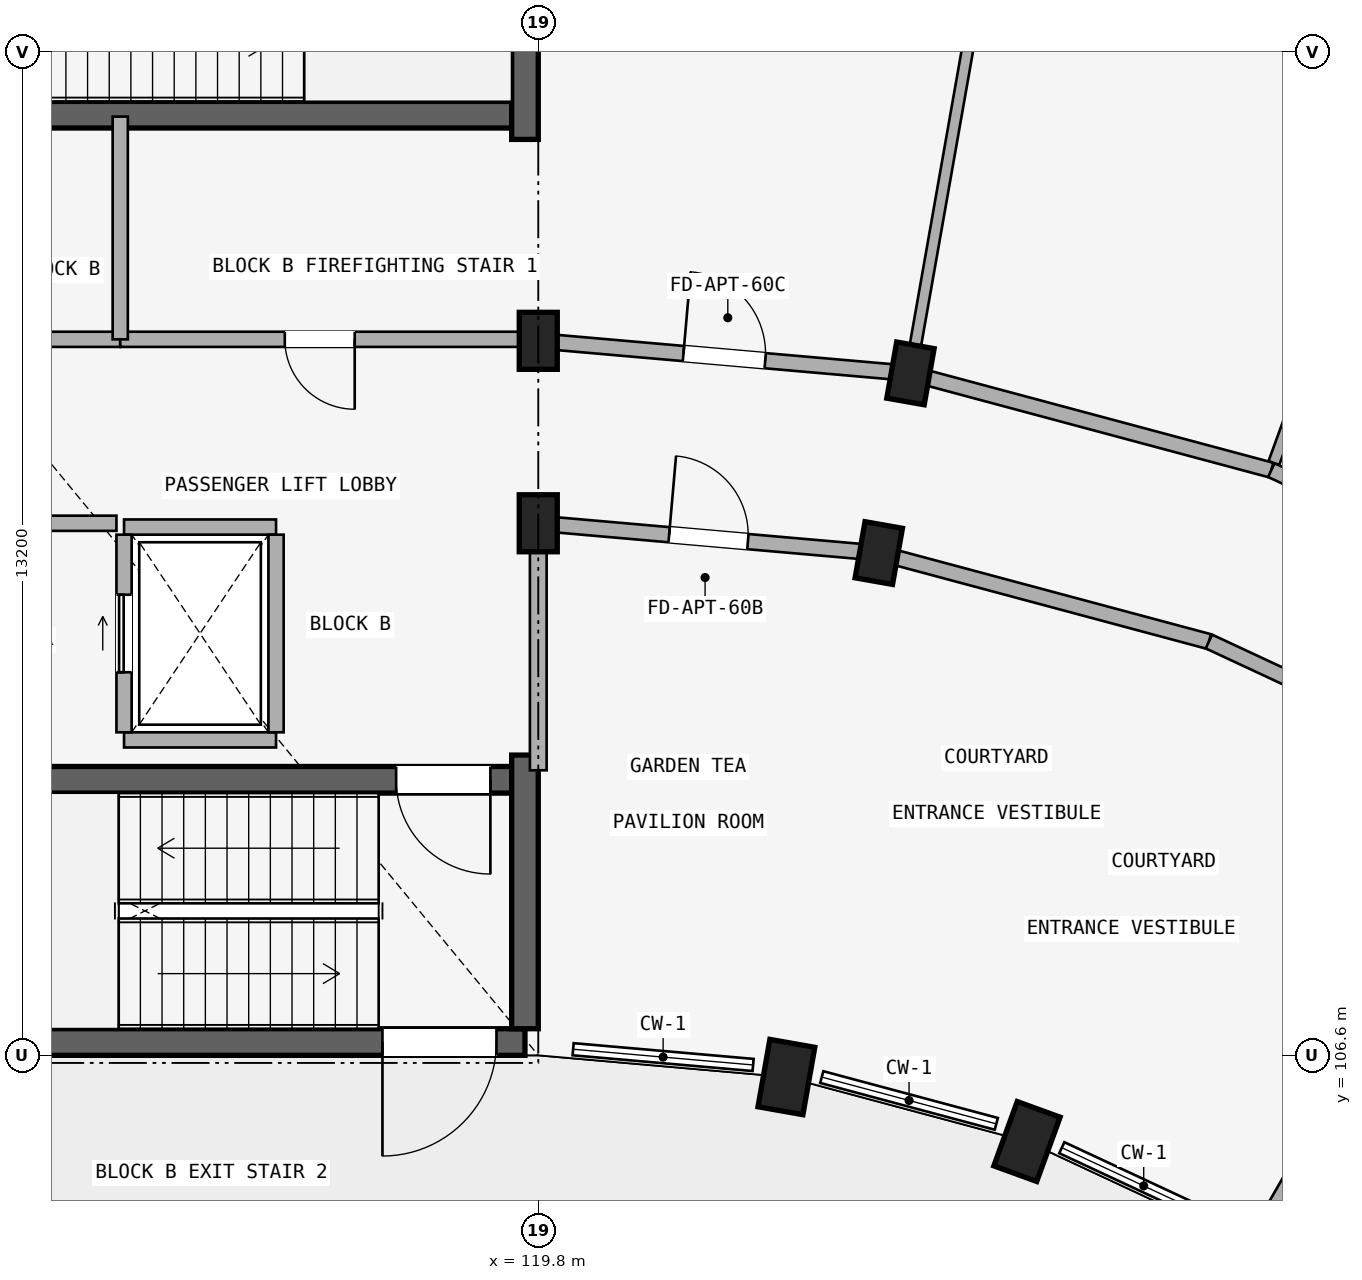
"""IFC4 building model, lengths in metres.
Left out: names, types, materials, properties, quantities, classifications, styles, units other than length and angle.
Written with IfcOpenShell. Run it as: python <this file> out.ifc"""

import sys

from ifc_helpers import new_model, si_unit, direction, frame, frame_2d, origin, origin_2d, place, context, subcontext, project, spatial, rectangle, extrude, element, fill, save


model = new_model("IFC4")
c1 = context("Model", 3, precision=1e-05, world=origin(), true_north=direction((0.0, 1.0)))
c2 = subcontext(c1, "Body", "Model", "MODEL_VIEW")
j1 = project(units=[si_unit("LENGTHUNIT", "METRE"), si_unit("PLANEANGLEUNIT", "RADIAN")], contexts=[c1])
p1 = place(None, origin())
s1 = spatial("IfcSite", under=j1, at=p1, CompositionType="ELEMENT")
p2 = place(p1, origin())
s2 = spatial("IfcBuilding", under=s1, at=p2, CompositionType="ELEMENT")
p3 = place(p2, origin())
s3 = spatial("IfcBuildingStorey", under=s2, at=p3, CompositionType="ELEMENT", Elevation=0.0)
p4 = place(p3, frame((119.45, 118.975, 0.0), z_axis=(0.0, 0.0, 1.0), x_axis=(-1.0, 0.0, 0.0)))
e1 = element("IfcWall", 1, at=p4, inside=s3, PredefinedType="SHEAR", context=c2, shape_type="SweptSolid", body=[
    extrude(rectangle(XDim=8.075, YDim=0.35, at=frame_2d((4.038, 0.0))), origin(), (0.0, 0.0, 1.0), 4.15),
])
p5 = place(p4, frame((6.38, 0.0, 0.0)))
e2 = element("IfcOpeningElement", 2, at=p5, cuts=e1, PredefinedType="OPENING", context=c2, shape_type="SweptSolid", body=[
    extrude(rectangle(XDim=1.24, YDim=2.15, at=frame_2d((0.62, 1.075))), frame((0.0, 0.185, 0.0), z_axis=(0.0, -1.0, 0.0), x_axis=(1.0, 0.0, 0.0)), (0.0, 0.0, 1.0), 0.37),
])
p6 = place(p3, frame((119.625, 118.65, 0.0), z_axis=(0.0, 0.0, 1.0), x_axis=(0.0, 1.0, 0.0)))
e3 = element("IfcWall", 3, at=p6, inside=s3, PredefinedType="SHEAR", context=c2, shape_type="SweptSolid", body=[
    extrude(rectangle(XDim=3.6, YDim=0.35, at=frame_2d((1.8, 0.0))), origin(), (0.0, 0.0, 1.0), 4.15),
])
p7 = place(p3, frame((119.625, 106.775, 0.0), z_axis=(0.0, 0.0, 1.0), x_axis=(-1.0, 0.0, 0.0)))
e4 = element("IfcWall", 4, at=p7, inside=s3, PredefinedType="SHEAR", context=c2, shape_type="SweptSolid", body=[
    extrude(rectangle(XDim=8.25, YDim=0.35, at=frame_2d((4.125, 0.0))), origin(), (0.0, 0.0, 1.0), 4.15),
])
p8 = place(p7, frame((0.375, 0.0, 0.0)))
e5 = element("IfcOpeningElement", 5, at=p8, cuts=e4, PredefinedType="OPENING", context=c2, shape_type="SweptSolid", body=[
    extrude(rectangle(XDim=1.5, YDim=2.15, at=frame_2d((0.75, 1.075))), frame((0.0, 0.185, 0.0), z_axis=(0.0, -1.0, 0.0), x_axis=(1.0, 0.0, 0.0)), (0.0, 0.0, 1.0), 0.37),
])
p9 = place(p3, frame((119.45, 110.225, 0.0), z_axis=(0.0, 0.0, 1.0), x_axis=(-1.0, 0.0, 0.0)))
e6 = element("IfcWall", 6, at=p9, inside=s3, PredefinedType="SHEAR", context=c2, shape_type="SweptSolid", body=[
    extrude(rectangle(XDim=7.9, YDim=0.35, at=frame_2d((3.95, 0.0))), origin(), (0.0, 0.0, 1.0), 4.15),
])
p10 = place(p9, frame((0.28, 0.0, 0.0)))
e7 = element("IfcOpeningElement", 7, at=p10, cuts=e6, PredefinedType="OPENING", context=c2, shape_type="SweptSolid", body=[
    extrude(rectangle(XDim=1.24, YDim=2.15, at=frame_2d((0.62, 1.075))), frame((0.0, 0.185, 0.0), z_axis=(0.0, -1.0, 0.0), x_axis=(1.0, 0.0, 0.0)), (0.0, 0.0, 1.0), 0.37),
])
p11 = place(p3, frame((119.625, 106.95, 0.0), z_axis=(0.0, 0.0, 1.0), x_axis=(0.0, 1.0, 0.0)))
e8 = element("IfcWall", 8, at=p11, inside=s3, PredefinedType="SHEAR", context=c2, shape_type="SweptSolid", body=[
    extrude(rectangle(XDim=3.6, YDim=0.35, at=frame_2d((1.8, 0.0))), origin(), (0.0, 0.0, 1.0), 4.15),
])
for number, where, z_axis, x_axis in (
    (9, (119.8, 113.6, 0.0), (0.0, 0.0, 1.0), (1.0, 0.0, 0.0)),
    (10, (119.8, 116.0, 0.0), (0.0, 0.0, 1.0), (1.0, 0.0, 0.0)),
):
    element("IfcColumn", number, at=place(p3, frame(where, z_axis=z_axis, x_axis=x_axis)), inside=s3, PredefinedType="COLUMN", context=c2, shape_type="SweptSolid", body=[
        extrude(rectangle(XDim=0.5, YDim=0.75, at=origin_2d()), origin(), (0.0, 0.0, 1.0), 4.15),
    ])
p12 = place(p3, frame((123.065, 106.314, 0.0), z_axis=(0.0, 0.0, 1.0), x_axis=(-0.984807753012, 0.173648177667, 0.0)))
e11 = element("IfcColumn", 11, at=p12, inside=s3, PredefinedType="COLUMN", context=c2, shape_type="SweptSolid", body=[
    extrude(rectangle(XDim=0.6, YDim=0.9, at=origin_2d()), origin(), (0.0, 0.0, 1.0), 4.15),
])
for number, where, z_axis, x_axis in (
    (12, (124.28, 113.208, 0.0), (0.0, 0.0, 1.0), (-0.985, 0.174, 0.0)),
    (13, (124.697, 115.572, 0.0), (0.0, 0.0, 1.0), (-0.985, 0.174, 0.0)),
):
    element("IfcColumn", number, at=place(p3, frame(where, z_axis=z_axis, x_axis=x_axis)), inside=s3, PredefinedType="COLUMN", context=c2, shape_type="SweptSolid", body=[
        extrude(rectangle(XDim=0.5, YDim=0.75, at=origin_2d()), origin(), (0.0, 0.0, 1.0), 4.15),
    ])
p13 = place(p3, frame((126.23, 105.466, 0.0), z_axis=(0.0, 0.0, 1.0), x_axis=(-0.939692620786, 0.342020143326, 0.0)))
e14 = element("IfcColumn", 14, at=p13, inside=s3, PredefinedType="COLUMN", context=c2, shape_type="SweptSolid", body=[
    extrude(rectangle(XDim=0.6, YDim=0.9, at=origin_2d()), origin(), (0.0, 0.0, 1.0), 4.15),
])
p14 = place(p3, frame((114.3, 116.02, 0.0), z_axis=(0.0, 0.0, 1.0), x_axis=(-1.0, 0.0, 0.0)))
e15 = element("IfcWall", 15, at=p14, inside=s3, PredefinedType="STANDARD", context=c2, shape_type="SweptSolid", body=[
    extrude(rectangle(XDim=5.65, YDim=0.2, at=frame_2d((2.825, 0.0))), origin(), (0.0, 0.0, 1.0), 3.492),
])
p15 = place(p14, frame((1.923, 0.0, 0.0)))
e16 = element("IfcOpeningElement", 16, at=p15, cuts=e15, PredefinedType="OPENING", context=c2, shape_type="SweptSolid", body=[
    extrude(rectangle(XDim=1.24, YDim=2.15, at=frame_2d((0.62, 1.075))), frame((0.0, 0.11, 0.0), z_axis=(0.0, -1.0, 0.0), x_axis=(1.0, 0.0, 0.0)), (0.0, 0.0, 1.0), 0.22),
])
p16 = place(p3, frame((119.55, 116.02, 0.0), z_axis=(0.0, 0.0, 1.0), x_axis=(-1.0, 0.0, 0.0)))
e17 = element("IfcWall", 17, at=p16, inside=s3, PredefinedType="STANDARD", context=c2, shape_type="SweptSolid", body=[
    extrude(rectangle(XDim=5.25, YDim=0.2, at=frame_2d((2.625, 0.0))), origin(), (0.0, 0.0, 1.0), 3.492),
])
p17 = place(p16, frame((2.165, 0.0, 0.0)))
e18 = element("IfcOpeningElement", 18, at=p17, cuts=e17, PredefinedType="OPENING", context=c2, shape_type="SweptSolid", body=[
    extrude(rectangle(XDim=0.92, YDim=2.1, at=frame_2d((0.46, 1.05))), frame((0.0, 0.11, 0.0), z_axis=(0.0, -1.0, 0.0), x_axis=(1.0, 0.0, 0.0)), (0.0, 0.0, 1.0), 0.22),
])
p18 = place(p3, frame((114.3, 116.02, 0.0), z_axis=(0.0, 0.0, 1.0), x_axis=(0.0, 1.0, 0.0)))
e19 = element("IfcWall", 19, at=p18, inside=s3, PredefinedType="STANDARD", context=c2, shape_type="SweptSolid", body=[
    extrude(rectangle(XDim=2.93, YDim=0.2, at=frame_2d((1.465, 0.0))), origin(), (0.0, 0.0, 1.0), 3.492),
])
p19 = place(p3, frame((116.35, 110.75, 0.0), z_axis=(0.0, 0.0, 1.0), x_axis=(-1.0, 0.0, 0.0)))
e20 = element("IfcWall", 20, at=p19, inside=s3, PredefinedType="STANDARD", context=c2, shape_type="SweptSolid", body=[
    extrude(rectangle(XDim=2.0, YDim=0.2, at=frame_2d((1.0, 0.0))), origin(), (0.0, 0.0, 1.0), 4.15),
])
p20 = place(p3, frame((116.35, 113.55, 0.0), z_axis=(0.0, 0.0, 1.0), x_axis=(-1.0, 0.0, 0.0)))
e21 = element("IfcWall", 21, at=p20, inside=s3, PredefinedType="STANDARD", context=c2, shape_type="SweptSolid", body=[
    extrude(rectangle(XDim=2.0, YDim=0.2, at=frame_2d((1.0, 0.0))), origin(), (0.0, 0.0, 1.0), 3.492),
])
p21 = place(p3, frame((116.35, 110.85, 0.0), z_axis=(0.0, 0.0, 1.0), x_axis=(0.0, 1.0, 0.0)))
e22 = element("IfcWall", 22, at=p21, inside=s3, PredefinedType="STANDARD", context=c2, shape_type="SweptSolid", body=[
    extrude(rectangle(XDim=2.6, YDim=0.2, at=frame_2d((1.3, 0.0))), origin(), (0.0, 0.0, 1.0), 3.492),
])
p22 = place(p3, frame((114.35, 110.85, 0.0), z_axis=(0.0, 0.0, 1.0), x_axis=(0.0, 1.0, 0.0)))
e23 = element("IfcWall", 23, at=p22, inside=s3, PredefinedType="STANDARD", context=c2, shape_type="SweptSolid", body=[
    extrude(rectangle(XDim=2.6, YDim=0.2, at=frame_2d((1.3, 0.0))), origin(), (0.0, 0.0, 1.0), 3.492),
])
p23 = place(p22, frame((0.79, 0.0, 0.0)))
e24 = element("IfcOpeningElement", 24, at=p23, cuts=e23, PredefinedType="OPENING", context=c2, shape_type="SweptSolid", body=[
    extrude(rectangle(XDim=1.02, YDim=2.15, at=frame_2d((0.51, 1.075))), frame((0.0, 0.11, 0.0), z_axis=(0.0, -1.0, 0.0), x_axis=(1.0, 0.0, 0.0)), (0.0, 0.0, 1.0), 0.22),
])
p24 = place(p3, frame((114.25, 113.6, 0.0), z_axis=(0.0, 0.0, 1.0), x_axis=(-1.0, 0.0, 0.0)))
e25 = element("IfcWall", 25, at=p24, inside=s3, PredefinedType="STANDARD", context=c2, shape_type="SweptSolid", body=[
    extrude(rectangle(XDim=5.6, YDim=0.2, at=frame_2d((2.8, 0.0))), origin(), (0.0, 0.0, 1.0), 3.492),
])
p25 = place(p24, frame((1.91, 0.0, 0.0)))
e26 = element("IfcOpeningElement", 26, at=p25, cuts=e25, PredefinedType="OPENING", context=c2, shape_type="SweptSolid", body=[
    extrude(rectangle(XDim=1.22, YDim=2.15, at=frame_2d((0.61, 1.075))), frame((0.0, 0.11, 0.0), z_axis=(0.0, -1.0, 0.0), x_axis=(1.0, 0.0, 0.0)), (0.0, 0.0, 1.0), 0.22),
])
p26 = place(p3, frame((119.8, 113.6, 0.0), z_axis=(0.0, 0.0, 1.0), x_axis=(0.996191949488, -0.087187153726, 0.0)))
e27 = element("IfcWall", 27, at=p26, inside=s3, PredefinedType="STANDARD", context=c2, shape_type="SweptSolid", body=[
    extrude(rectangle(XDim=4.497, YDim=0.2, at=frame_2d((2.249, 0.0))), origin(), (0.0, 0.0, 1.0), 3.492),
])
p27 = place(p26, frame((1.729, 0.0, 0.0)))
e28 = element("IfcOpeningElement", 28, at=p27, cuts=e27, PredefinedType="OPENING", context=c2, shape_type="SweptSolid", body=[
    extrude(rectangle(XDim=1.04, YDim=2.15, at=frame_2d((0.52, 1.075))), frame((0.0, 0.11, 0.0), z_axis=(0.0, -1.0, 0.0), x_axis=(1.0, 0.0, 0.0)), (0.0, 0.0, 1.0), 0.22),
])
p28 = place(p3, frame((119.8, 116.0, 0.0), z_axis=(0.0, 0.0, 1.0), x_axis=(0.996193663584, -0.087167566415, 0.0)))
e29 = element("IfcWall", 29, at=p28, inside=s3, PredefinedType="STANDARD", context=c2, shape_type="SweptSolid", body=[
    extrude(rectangle(XDim=4.916, YDim=0.2, at=frame_2d((2.458, 0.0))), origin(), (0.0, 0.0, 1.0), 3.492),
])
p29 = place(p28, frame((1.918, 0.0, 0.0)))
e30 = element("IfcOpeningElement", 30, at=p29, cuts=e29, PredefinedType="OPENING", context=c2, shape_type="SweptSolid", body=[
    extrude(rectangle(XDim=1.08, YDim=2.15, at=frame_2d((0.54, 1.075))), frame((0.0, 0.11, 0.0), z_axis=(0.0, -1.0, 0.0), x_axis=(1.0, 0.0, 0.0)), (0.0, 0.0, 1.0), 0.22),
])
p30 = place(p3, frame((124.28, 113.208, 0.0), z_axis=(0.0, 0.0, 1.0), x_axis=(0.965934240054, -0.258787642463, 0.0)))
e31 = element("IfcWall", 31, at=p30, inside=s3, PredefinedType="STANDARD", context=c2, shape_type="SweptSolid", body=[
    extrude(rectangle(XDim=4.497, YDim=0.2, at=frame_2d((2.249, 0.0))), origin(), (0.0, 0.0, 1.0), 2.742),
])
p31 = place(p3, frame((124.697, 115.572, 0.0), z_axis=(0.0, 0.0, 1.0), x_axis=(0.965930095386, -0.258803112091, 0.0)))
e32 = element("IfcWall", 32, at=p31, inside=s3, PredefinedType="STANDARD", context=c2, shape_type="SweptSolid", body=[
    extrude(rectangle(XDim=4.916, YDim=0.2, at=frame_2d((2.458, 0.0))), origin(), (0.0, 0.0, 1.0), 2.942),
])
p32 = place(p3, frame((128.624, 112.044, 0.0), z_axis=(0.0, 0.0, 1.0), x_axis=(0.906307919131, -0.422617978463, 0.0)))
e33 = element("IfcWall", 33, at=p32, inside=s3, PredefinedType="STANDARD", context=c2, shape_type="SweptSolid", body=[
    extrude(rectangle(XDim=4.497, YDim=0.2, at=frame_2d((2.249, 0.0))), origin(), (0.0, 0.0, 1.0), 2.742),
])
p33 = place(p3, frame((129.445, 114.299, 0.0), z_axis=(0.0, 0.0, 1.0), x_axis=(0.906302381024, -0.422629854778, 0.0)))
e34 = element("IfcWall", 34, at=p33, inside=s3, PredefinedType="STANDARD", context=c2, shape_type="SweptSolid", body=[
    extrude(rectangle(XDim=4.915, YDim=0.2, at=frame_2d((2.458, 0.0))), origin(), (0.0, 0.0, 1.0), 2.942),
])
p34 = place(p3, frame((119.8, 110.35, 0.0), z_axis=(0.0, 0.0, 1.0), x_axis=(0.0, 1.0, 0.0)))
e35 = element("IfcWall", 35, at=p34, inside=s3, PredefinedType="STANDARD", context=c2, shape_type="SweptSolid", body=[
    extrude(rectangle(XDim=3.2, YDim=0.22, at=frame_2d((1.6, 0.0))), origin(), (0.0, 0.0, 1.0), 3.492),
])
p35 = place(p3, frame((124.714, 115.67, 0.0), z_axis=(0.0, 0.0, 1.0), x_axis=(0.173646216546, 0.984808098809, 0.0)))
e36 = element("IfcWall", 36, at=p35, inside=s3, PredefinedType="PARTITIONING", context=c2, shape_type="SweptSolid", body=[
    extrude(rectangle(XDim=17.42, YDim=0.15, at=frame_2d((8.71, 0.0))), origin(), (0.0, 0.0, 1.0), 2.942),
])
p36 = place(p35, frame((4.45, 0.0, 0.0)))
e37 = element("IfcOpeningElement", 37, at=p36, cuts=e36, PredefinedType="OPENING", context=c2, shape_type="SweptSolid", body=[
    extrude(rectangle(XDim=0.8, YDim=2.1, at=frame_2d((0.4, 1.05))), frame((0.0, 0.085, 0.0), z_axis=(0.0, -1.0, 0.0), x_axis=(1.0, 0.0, 0.0)), (0.0, 0.0, 1.0), 0.17),
])
p37 = place(p3, frame((129.479, 114.393, 0.0), z_axis=(0.0, 0.0, 1.0), x_axis=(0.342022120477, 0.939691901159, 0.0)))
e38 = element("IfcWall", 38, at=p37, inside=s3, PredefinedType="PARTITIONING", context=c2, shape_type="SweptSolid", body=[
    extrude(rectangle(XDim=17.42, YDim=0.15, at=frame_2d((8.71, 0.0))), origin(), (0.0, 0.0, 1.0), 3.492),
])
p38 = place(p37, frame((4.45, 0.0, 0.0)))
e39 = element("IfcOpeningElement", 39, at=p38, cuts=e38, PredefinedType="OPENING", context=c2, shape_type="SweptSolid", body=[
    extrude(rectangle(XDim=0.8, YDim=2.1, at=frame_2d((0.4, 1.05))), frame((0.0, 0.085, 0.0), z_axis=(0.0, -1.0, 0.0), x_axis=(1.0, 0.0, 0.0)), (0.0, 0.0, 1.0), 0.17),
])
p39 = place(p3, frame((129.3, 104.254, 0.0), z_axis=(0.0, 0.0, 1.0), x_axis=(0.499997969693, 0.866026575979, 0.0)))
e40 = element("IfcWall", 40, at=p39, inside=s3, PredefinedType="STANDARD", context=c2, shape_type="SweptSolid", body=[
    extrude(rectangle(XDim=6.75, YDim=0.22, at=frame_2d((3.375, 0.0))), origin(), (0.0, 0.0, 1.0), 2.742),
])
p40 = place(p17, origin())
e41 = element("IfcDoor", 41, at=p40, inside=s3, OperationType="SINGLE_SWING_LEFT", PredefinedType="DOOR", context=c2, shape_type="SweptSolid", body=[
    extrude(rectangle(XDim=0.92, YDim=2.1, at=frame_2d((0.46, 1.05))), frame((0.0, 0.025, 0.0), z_axis=(0.0, -1.0, 0.0), x_axis=(1.0, 0.0, 0.0)), (0.0, 0.0, 1.0), 0.05),
])
fill(e18, e41)
p41 = place(p10, frame((1.24, 0.0, 0.0), z_axis=(0.0, 0.0, 1.0), x_axis=(-1.0, 0.0, 0.0)))
e42 = element("IfcDoor", 42, at=p41, inside=s3, OperationType="SINGLE_SWING_RIGHT", PredefinedType="DOOR", context=c2, shape_type="SweptSolid", body=[
    extrude(rectangle(XDim=1.24, YDim=2.15, at=frame_2d((0.62, 1.075))), frame((0.0, 0.025, 0.0), z_axis=(0.0, -1.0, 0.0), x_axis=(1.0, 0.0, 0.0)), (0.0, 0.0, 1.0), 0.05),
])
fill(e7, e42)
p42 = place(p8, origin())
e43 = element("IfcDoor", 43, at=p42, inside=s3, OperationType="SINGLE_SWING_RIGHT", PredefinedType="DOOR", context=c2, shape_type="SweptSolid", body=[
    extrude(rectangle(XDim=1.5, YDim=2.15, at=frame_2d((0.75, 1.075))), frame((0.0, 0.025, 0.0), z_axis=(0.0, -1.0, 0.0), x_axis=(1.0, 0.0, 0.0)), (0.0, 0.0, 1.0), 0.05),
])
fill(e5, e43)
p43 = place(p23, origin())
e44 = element("IfcDoor", 44, at=p43, inside=s3, OperationType="SLIDING_TO_RIGHT", PredefinedType="DOOR", context=c2, shape_type="SweptSolid", body=[
    extrude(rectangle(XDim=1.02, YDim=2.15, at=frame_2d((0.51, 1.075))), frame((0.0, 0.025, 0.0), z_axis=(0.0, -1.0, 0.0), x_axis=(1.0, 0.0, 0.0)), (0.0, 0.0, 1.0), 0.05),
])
fill(e24, e44)
p44 = place(p29, frame((1.08, 0.0, 0.0), z_axis=(0.0, 0.0, 1.0), x_axis=(-1.0, 0.0, 0.0)))
e45 = element("IfcDoor", 45, at=p44, inside=s3, OperationType="SINGLE_SWING_RIGHT", PredefinedType="DOOR", context=c2, shape_type="SweptSolid", body=[
    extrude(rectangle(XDim=1.08, YDim=2.15, at=frame_2d((0.54, 1.075))), frame((0.0, 0.025, 0.0), z_axis=(0.0, -1.0, 0.0), x_axis=(1.0, 0.0, 0.0)), (0.0, 0.0, 1.0), 0.05),
])
fill(e30, e45)
p45 = place(p27, origin())
e46 = element("IfcDoor", 46, at=p45, inside=s3, OperationType="SINGLE_SWING_LEFT", PredefinedType="DOOR", context=c2, shape_type="SweptSolid", body=[
    extrude(rectangle(XDim=1.04, YDim=2.15, at=frame_2d((0.52, 1.075))), frame((0.0, 0.025, 0.0), z_axis=(0.0, -1.0, 0.0), x_axis=(1.0, 0.0, 0.0)), (0.0, 0.0, 1.0), 0.05),
])
fill(e28, e46)
save(model, sys.argv[1])
